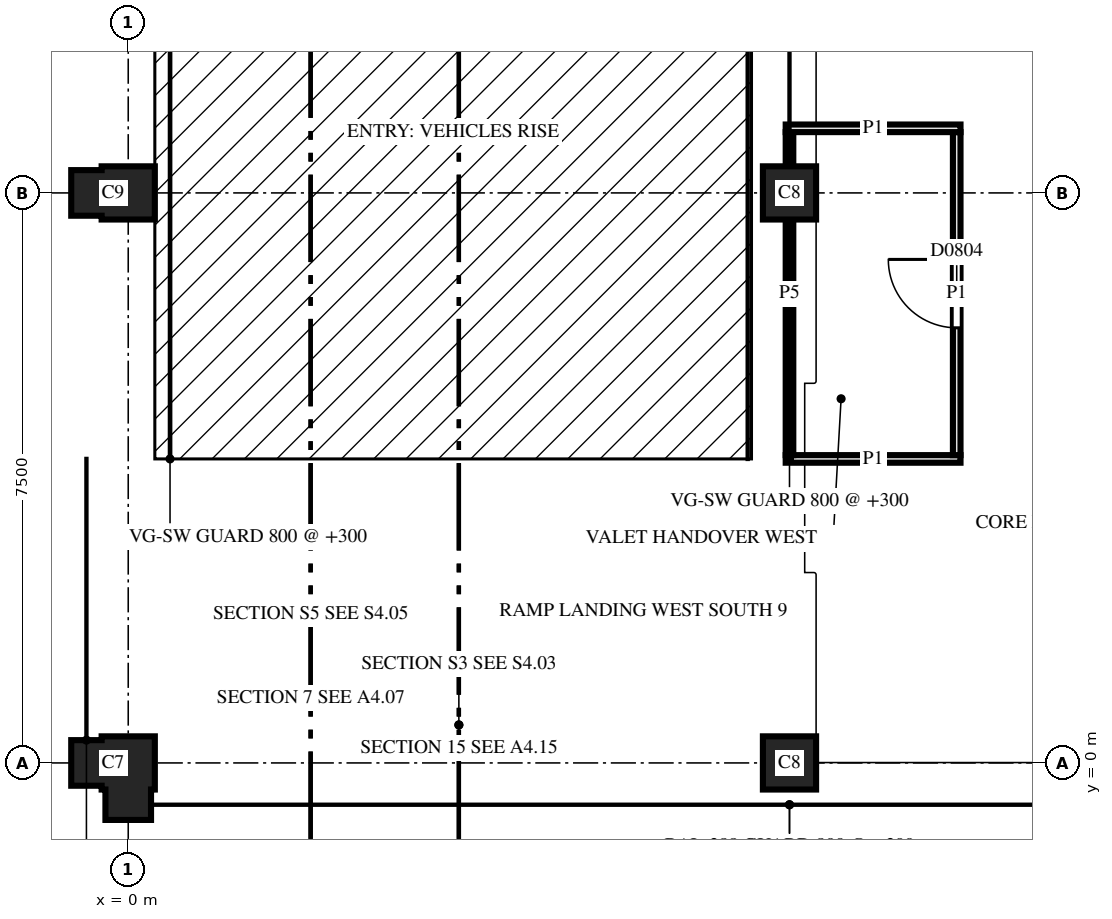
"""IFC4 building model, lengths in metres.
Left out: names, types, materials, properties, quantities, classifications, styles, units other than length and angle.
Written with IfcOpenShell. Run it as: python <this file> out.ifc"""

import sys

from ifc_helpers import new_model, si_unit, direction, frame, frame_2d, origin, place, context, subcontext, project, spatial, polyline, rectangle, outline, extrude, element, fill, save


model = new_model("IFC4")
c1 = context("Model", 3, precision=1e-05, world=origin(), true_north=direction((0.0, 1.0)))
c2 = subcontext(c1, "Body", "Model", "MODEL_VIEW")
j1 = project(units=[si_unit("LENGTHUNIT", "METRE"), si_unit("PLANEANGLEUNIT", "RADIAN")], contexts=[c1])
p1 = place(None, origin())
s1 = spatial("IfcSite", under=j1, at=p1, CompositionType="ELEMENT")
p2 = place(p1, origin())
s2 = spatial("IfcBuilding", under=s1, at=p2, CompositionType="ELEMENT")
p3 = place(p2, frame((0.0, 0.0, 30.4)))
s3 = spatial("IfcBuildingStorey", under=s2, at=p3, CompositionType="ELEMENT", Elevation=30.4)
p4 = place(p3, frame((0.0, 0.0, 0.0), z_axis=(0.0, 0.0, 1.0), x_axis=(-1.0, 0.0, 0.0)))
e1 = element("IfcColumn", 1, at=p4, inside=s3, PredefinedType="COLUMN", context=c2, shape_type="SweptSolid", body=[
    extrude(outline(polyline([(-0.35, -0.35), (0.35, -0.35), (0.35, -0.3), (0.75, -0.3), (0.75, 0.3), (0.35, 0.3), (0.35, 0.35), (0.3, 0.35), (0.3, 0.75), (-0.3, 0.75), (-0.3, 0.35), (-0.35, 0.35), (-0.35, -0.35)])), origin(), (0.0, 0.0, 1.0), 3.7),
])
p5 = place(p3, frame((8.7, 0.0, 0.0), z_axis=(0.0, 0.0, 1.0), x_axis=(1.0, 0.0, 0.0)))
e2 = element("IfcColumn", 2, at=p5, inside=s3, PredefinedType="COLUMN", context=c2, shape_type="SweptSolid", body=[
    extrude(outline(polyline([(-0.35, -0.35), (0.35, -0.35), (0.35, 0.35), (-0.35, 0.35), (-0.35, -0.35)])), origin(), (0.0, 0.0, 1.0), 3.7),
])
p6 = place(p3, frame((0.0, 7.5, 0.0), z_axis=(0.0, 0.0, 1.0), x_axis=(-1.0, 0.0, 0.0)))
e3 = element("IfcColumn", 3, at=p6, inside=s3, PredefinedType="COLUMN", context=c2, shape_type="SweptSolid", body=[
    extrude(outline(polyline([(-0.35, -0.35), (0.35, -0.35), (0.35, -0.3), (0.75, -0.3), (0.75, 0.3), (0.35, 0.3), (0.35, 0.35), (-0.35, 0.35), (-0.35, -0.35)])), origin(), (0.0, 0.0, 1.0), 3.7),
])
p7 = place(p3, frame((8.7, 7.5, 0.0), z_axis=(0.0, 0.0, 1.0), x_axis=(1.0, 0.0, 0.0)))
e4 = element("IfcColumn", 4, at=p7, inside=s3, PredefinedType="COLUMN", context=c2, shape_type="SweptSolid", body=[
    extrude(outline(polyline([(-0.35, -0.35), (0.35, -0.35), (0.35, 0.35), (-0.35, 0.35), (-0.35, -0.35)])), origin(), (0.0, 0.0, 1.0), 3.7),
])
p8 = place(p3, frame((8.65, 4.0, 0.0), z_axis=(0.0, 0.0, 1.0), x_axis=(1.0, 0.0, 0.0)))
e5 = element("IfcWall", 5, at=p8, inside=s3, PredefinedType="PARTITIONING", context=c2, shape_type="SweptSolid", body=[
    extrude(rectangle(XDim=2.3, YDim=0.1, at=frame_2d((1.15, 0.0))), origin(), (0.0, 0.0, 1.0), 2.88),
])
p9 = place(p3, frame((10.9, 4.05, 0.0), z_axis=(0.0, 0.0, 1.0), x_axis=(0.0, 1.0, 0.0)))
e6 = element("IfcWall", 6, at=p9, inside=s3, PredefinedType="PARTITIONING", context=c2, shape_type="SweptSolid", body=[
    extrude(rectangle(XDim=4.25, YDim=0.1, at=frame_2d((2.125, 0.0))), origin(), (0.0, 0.0, 1.0), 2.88),
])
p10 = place(p9, frame((1.675, 0.0, 0.0)))
e7 = element("IfcOpeningElement", 7, at=p10, cuts=e6, PredefinedType="OPENING", context=c2, shape_type="SweptSolid", body=[
    extrude(rectangle(XDim=0.9, YDim=2.1, at=frame_2d((0.45, 1.05))), frame((0.0, 0.06, 0.0), z_axis=(0.0, -1.0, 0.0), x_axis=(1.0, 0.0, 0.0)), (0.0, 0.0, 1.0), 0.12),
])
p11 = place(p3, frame((8.7, 8.3, 0.0), z_axis=(0.0, 0.0, 1.0), x_axis=(0.0, -1.0, 0.0)))
e8 = element("IfcWall", 8, at=p11, inside=s3, PredefinedType="PARTITIONING", context=c2, shape_type="SweptSolid", body=[
    extrude(rectangle(XDim=4.25, YDim=0.1, at=frame_2d((2.125, 0.0))), origin(), (0.0, 0.0, 1.0), 2.6),
])
p12 = place(p3, frame((10.95, 8.35, 0.0), z_axis=(0.0, 0.0, 1.0), x_axis=(-1.0, 0.0, 0.0)))
e9 = element("IfcWall", 9, at=p12, inside=s3, PredefinedType="PARTITIONING", context=c2, shape_type="SweptSolid", body=[
    extrude(rectangle(XDim=2.3, YDim=0.1, at=frame_2d((1.15, 0.0))), origin(), (0.0, 0.0, 1.0), 2.88),
])
p13 = place(p10, origin())
e10 = element("IfcDoor", 10, at=p13, inside=s3, OperationType="SINGLE_SWING_LEFT", PredefinedType="DOOR", context=c2, shape_type="SweptSolid", body=[
    extrude(rectangle(XDim=0.9, YDim=2.1, at=frame_2d((0.45, 1.05))), frame((0.0, 0.025, 0.0), z_axis=(0.0, -1.0, 0.0), x_axis=(1.0, 0.0, 0.0)), (0.0, 0.0, 1.0), 0.05),
])
fill(e7, e10)
save(model, sys.argv[1])
